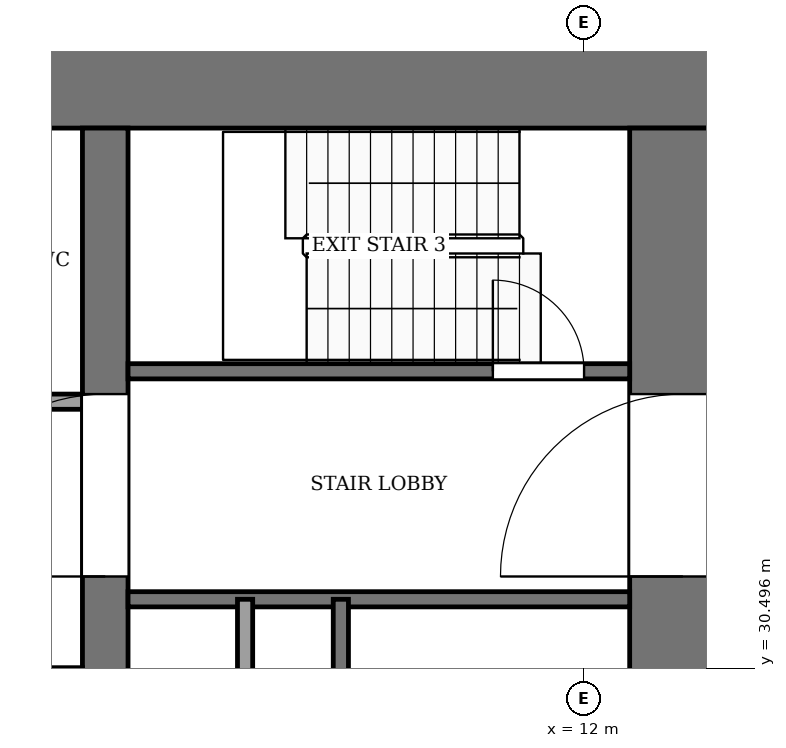
"""IFC4 building model, lengths in metres.
Left out: names, types, materials, properties, quantities, classifications, styles, units other than length and angle.
Written with IfcOpenShell. Run it as: python <this file> out.ifc"""

import sys

from ifc_helpers import new_model, si_unit, direction, frame, frame_2d, origin, place, context, subcontext, project, spatial, rectangle, extrude, element, fill, save


model = new_model("IFC4")
c1 = context("Model", 3, precision=1e-05, world=origin(), true_north=direction((0.0, 1.0)))
c2 = subcontext(c1, "Body", "Model", "MODEL_VIEW")
j1 = project(units=[si_unit("LENGTHUNIT", "METRE"), si_unit("PLANEANGLEUNIT", "RADIAN")], contexts=[c1])
p1 = place(None, origin())
s1 = spatial("IfcSite", under=j1, at=p1, CompositionType="ELEMENT")
p2 = place(p1, origin())
s2 = spatial("IfcBuilding", under=s1, at=p2, CompositionType="ELEMENT")
p3 = place(p2, frame((0.0, 0.0, 50.0)))
s3 = spatial("IfcBuildingStorey", under=s2, at=p3, CompositionType="ELEMENT", Elevation=50.0)
p4 = place(p3, frame((-14.0, 38.3, -0.13), z_axis=(0.0, 0.0, 1.0), x_axis=(1.0, 0.0, 0.0)))
e1 = element("IfcWall", 1, at=p4, inside=s3, PredefinedType="SHEAR", context=c2, shape_type="SweptSolid", body=[
    extrude(rectangle(XDim=28.0, YDim=1.4, at=frame_2d((14.0, 0.0))), origin(), (0.0, 0.0, 1.0), 4.0),
])
p5 = place(p3, frame((13.3, 18.4, -0.13), z_axis=(0.0, 0.0, 1.0), x_axis=(0.0, 1.0, 0.0)))
e2 = element("IfcWall", 2, at=p5, inside=s3, PredefinedType="SHEAR", context=c2, shape_type="SweptSolid", body=[
    extrude(rectangle(XDim=19.2, YDim=1.4, at=frame_2d((9.6, 0.0))), origin(), (0.0, 0.0, 1.0), 4.0),
])
p6 = place(p5, frame((2.8, 0.0, 0.13)))
e3 = element("IfcOpeningElement", 3, at=p6, cuts=e2, PredefinedType="OPENING", context=c2, shape_type="SweptSolid", body=[
    extrude(rectangle(XDim=2.4, YDim=2.4, at=frame_2d((1.2, 1.2))), frame((0.0, 0.71, 0.0), z_axis=(0.0, -1.0, 0.0), x_axis=(1.0, 0.0, 0.0)), (0.0, 0.0, 1.0), 1.42),
])
p7 = place(p5, frame((13.3, 0.0, 0.13)))
e4 = element("IfcOpeningElement", 4, at=p7, cuts=e2, PredefinedType="OPENING", context=c2, shape_type="SweptSolid", body=[
    extrude(rectangle(XDim=2.4, YDim=2.4, at=frame_2d((1.2, 1.2))), frame((0.0, 0.71, 0.0), z_axis=(0.0, -1.0, 0.0), x_axis=(1.0, 0.0, 0.0)), (0.0, 0.0, 1.0), 1.42),
])
p8 = place(p3, frame((5.7, 18.4, -0.13), z_axis=(0.0, 0.0, 1.0), x_axis=(0.0, 1.0, 0.0)))
e5 = element("IfcWall", 5, at=p8, inside=s3, PredefinedType="SHEAR", context=c2, shape_type="SweptSolid", body=[
    extrude(rectangle(XDim=19.2, YDim=0.6, at=frame_2d((9.6, 0.0))), origin(), (0.0, 0.0, 1.0), 4.0),
])
p9 = place(p8, frame((8.35, 0.0, 0.13)))
e6 = element("IfcOpeningElement", 6, at=p9, cuts=e5, PredefinedType="OPENING", context=c2, shape_type="SweptSolid", body=[
    extrude(rectangle(XDim=0.9, YDim=2.1, at=frame_2d((0.45, 1.05))), frame((0.0, 0.31, 0.0), z_axis=(0.0, -1.0, 0.0), x_axis=(1.0, 0.0, 0.0)), (0.0, 0.0, 1.0), 0.62),
])
p10 = place(p8, frame((13.3, 0.0, 0.13)))
e7 = element("IfcOpeningElement", 7, at=p10, cuts=e5, PredefinedType="OPENING", context=c2, shape_type="SweptSolid", body=[
    extrude(rectangle(XDim=2.4, YDim=2.4, at=frame_2d((1.2, 1.2))), frame((0.0, 0.31, 0.0), z_axis=(0.0, -1.0, 0.0), x_axis=(1.0, 0.0, 0.0)), (0.0, 0.0, 1.0), 0.62),
])
p11 = place(p3, frame((6.0, 31.4, 0.0), z_axis=(0.0, 0.0, 1.0), x_axis=(1.0, 0.0, 0.0)))
e8 = element("IfcWall", 8, at=p11, inside=s3, PredefinedType="PARTITIONING", context=c2, shape_type="SweptSolid", body=[
    extrude(rectangle(XDim=6.6, YDim=0.2, at=frame_2d((3.3, 0.0))), origin(), (0.0, 0.0, 1.0), 3.87),
])
p12 = place(p3, frame((-5.4, 34.0, 0.0), z_axis=(0.0, 0.0, 1.0), x_axis=(1.0, 0.0, 0.0)))
e9 = element("IfcWall", 9, at=p12, inside=s3, PredefinedType="PARTITIONING", context=c2, shape_type="SweptSolid", body=[
    extrude(rectangle(XDim=10.8, YDim=0.2, at=frame_2d((5.4, 0.0))), origin(), (0.0, 0.0, 1.0), 3.87),
])
p13 = place(p12, frame((6.15, 0.0, 0.0)))
e10 = element("IfcOpeningElement", 10, at=p13, cuts=e9, PredefinedType="OPENING", context=c2, shape_type="SweptSolid", body=[
    extrude(rectangle(XDim=1.2, YDim=2.2, at=frame_2d((0.6, 1.1))), frame((0.0, 0.11, 0.0), z_axis=(0.0, -1.0, 0.0), x_axis=(1.0, 0.0, 0.0)), (0.0, 0.0, 1.0), 0.22),
])
p14 = place(p12, frame((8.95, 0.0, 0.0)))
e11 = element("IfcOpeningElement", 11, at=p14, cuts=e9, PredefinedType="OPENING", context=c2, shape_type="SweptSolid", body=[
    extrude(rectangle(XDim=1.0, YDim=2.1, at=frame_2d((0.5, 1.05))), frame((0.0, 0.11, 0.0), z_axis=(0.0, -1.0, 0.0), x_axis=(1.0, 0.0, 0.0)), (0.0, 0.0, 1.0), 0.22),
])
p15 = place(p3, frame((6.0, 34.4, 0.0), z_axis=(0.0, 0.0, 1.0), x_axis=(1.0, 0.0, 0.0)))
e12 = element("IfcWall", 12, at=p15, inside=s3, PredefinedType="PARTITIONING", context=c2, shape_type="SweptSolid", body=[
    extrude(rectangle(XDim=6.6, YDim=0.2, at=frame_2d((3.3, 0.0))), origin(), (0.0, 0.0, 1.0), 3.87),
])
p16 = place(p15, frame((4.8, 0.0, 0.0)))
e13 = element("IfcOpeningElement", 13, at=p16, cuts=e12, PredefinedType="OPENING", context=c2, shape_type="SweptSolid", body=[
    extrude(rectangle(XDim=1.2, YDim=2.2, at=frame_2d((0.6, 1.1))), frame((0.0, 0.11, 0.0), z_axis=(0.0, -1.0, 0.0), x_axis=(1.0, 0.0, 0.0)), (0.0, 0.0, 1.0), 0.22),
])
for number, where, z_axis, x_axis in (
    (14, (7.54, 24.0, 0.0), (0.0, 0.0, 1.0), (0.0, 1.0, 0.0)),
    (15, (8.8, 24.0, 0.0), (0.0, 0.0, 1.0), (0.0, 1.0, 0.0)),
):
    element("IfcWall", number, at=place(p3, frame(where, z_axis=z_axis, x_axis=x_axis)), inside=s3, PredefinedType="PARTITIONING", context=c2, shape_type="SweptSolid", body=[
        extrude(rectangle(XDim=7.4, YDim=0.2, at=frame_2d((3.7, 0.0))), origin(), (0.0, 0.0, 1.0), 3.87),
    ])
p17 = place(p16, origin())
e16 = element("IfcDoor", 16, at=p17, inside=s3, OperationType="SINGLE_SWING_LEFT", PredefinedType="DOOR", context=c2, shape_type="SweptSolid", body=[
    extrude(rectangle(XDim=1.2, YDim=2.2, at=frame_2d((0.6, 1.1))), frame((0.0, 0.025, 0.0), z_axis=(0.0, -1.0, 0.0), x_axis=(1.0, 0.0, 0.0)), (0.0, 0.0, 1.0), 0.05),
])
fill(e13, e16)
p18 = place(p10, origin())
e17 = element("IfcDoor", 17, at=p18, inside=s3, OperationType="DOUBLE_DOOR_SINGLE_SWING", PredefinedType="DOOR", context=c2, shape_type="SweptSolid", body=[
    extrude(rectangle(XDim=2.4, YDim=2.4, at=frame_2d((1.2, 1.2))), frame((0.0, 0.025, 0.0), z_axis=(0.0, -1.0, 0.0), x_axis=(1.0, 0.0, 0.0)), (0.0, 0.0, 1.0), 0.05),
])
fill(e7, e17)
p19 = place(p7, origin())
e18 = element("IfcDoor", 18, at=p19, inside=s3, OperationType="DOUBLE_DOOR_SINGLE_SWING", PredefinedType="DOOR", context=c2, shape_type="SweptSolid", body=[
    extrude(rectangle(XDim=2.4, YDim=2.4, at=frame_2d((1.2, 1.2))), frame((0.0, 0.025, 0.0), z_axis=(0.0, -1.0, 0.0), x_axis=(1.0, 0.0, 0.0)), (0.0, 0.0, 1.0), 0.05),
])
fill(e4, e18)
save(model, sys.argv[1])
